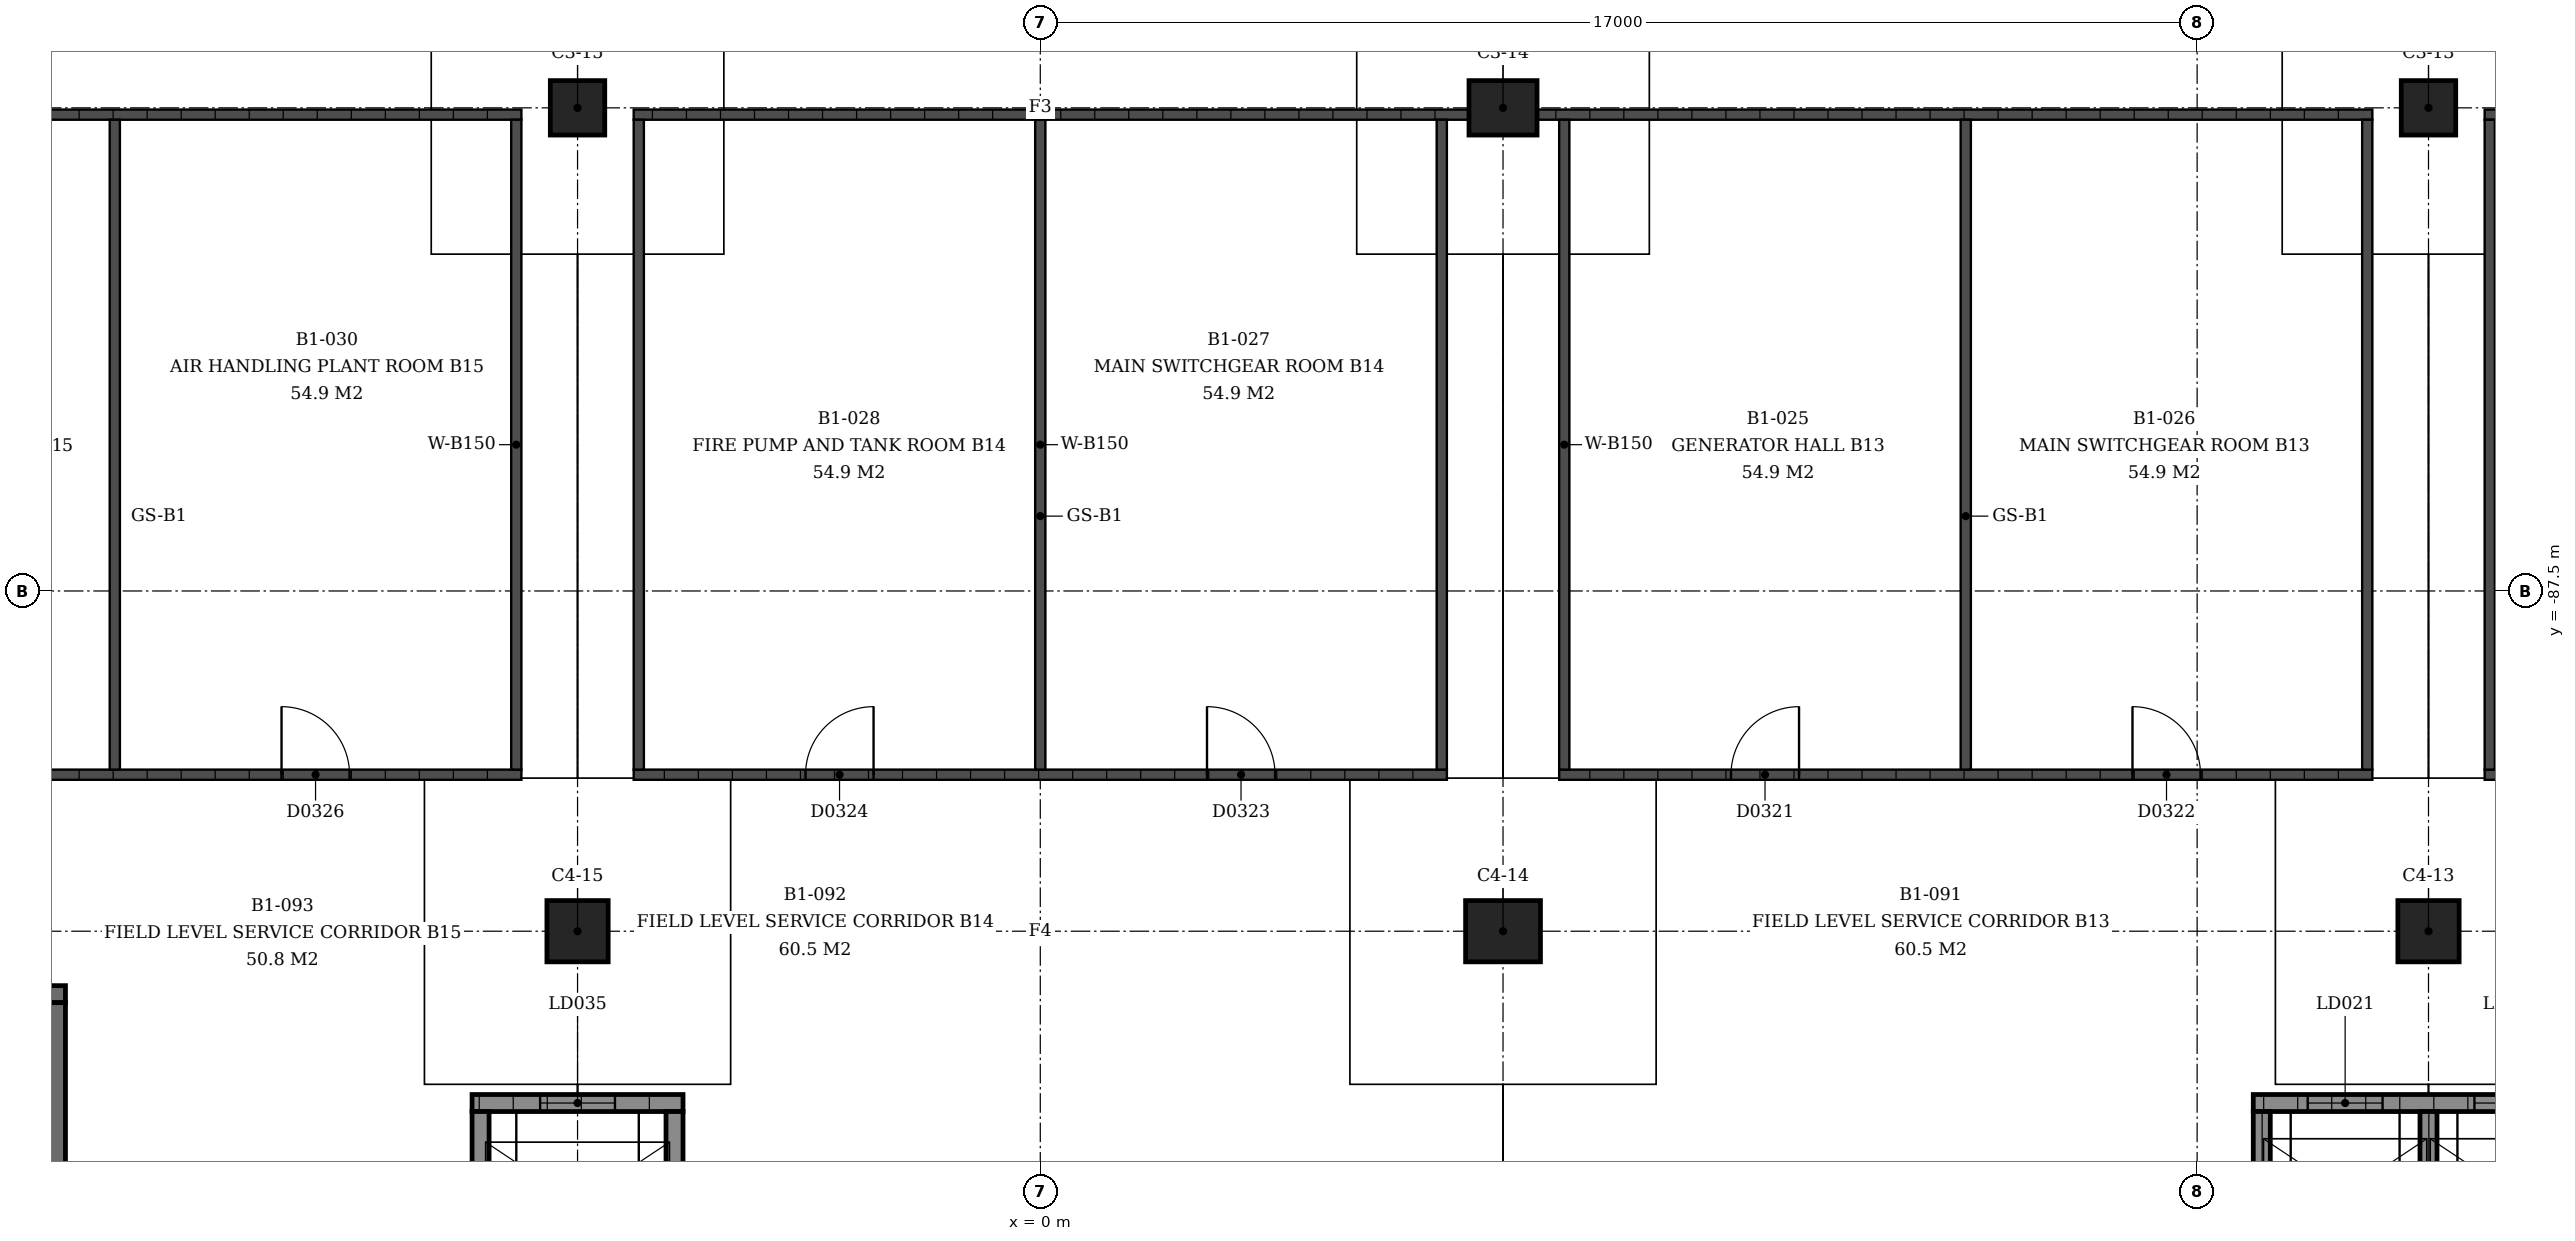
"""IFC4 building model, lengths in metres.
Left out: names, types, materials, properties, quantities, classifications, styles, units other than length and angle.
Written with IfcOpenShell. Run it as: python <this file> out.ifc"""

import sys

from ifc_helpers import new_model, si_unit, direction, frame, frame_2d, origin, origin_2d, place, context, subcontext, project, spatial, rectangle, extrude, element, fill, save


model = new_model("IFC4")
c1 = context("Model", 3, precision=1e-05, world=origin(), true_north=direction((0.0, 1.0)))
c2 = subcontext(c1, "Body", "Model", "MODEL_VIEW")
j1 = project(units=[si_unit("LENGTHUNIT", "METRE"), si_unit("PLANEANGLEUNIT", "RADIAN")], contexts=[c1])
p1 = place(None, origin())
s1 = spatial("IfcSite", under=j1, at=p1, CompositionType="ELEMENT")
p2 = place(p1, origin())
s2 = spatial("IfcBuilding", under=s1, at=p2, CompositionType="ELEMENT")
p3 = place(p2, frame((0.0, 0.0, -4.5)))
s3 = spatial("IfcBuildingStorey", under=s2, at=p3, CompositionType="ELEMENT", Elevation=-4.5)
p4 = place(p3, frame((20.4, -80.4, 0.0), z_axis=(0.0, 0.0, 1.0), x_axis=(1.0, 0.0, 0.0)))
e1 = element("IfcColumn", 1, at=p4, inside=s3, PredefinedType="COLUMN", context=c2, shape_type="SweptSolid", body=[
    extrude(rectangle(XDim=0.8, YDim=0.8, at=origin_2d()), origin(), (0.0, 0.0, 1.0), 4.5),
])
p5 = place(p3, frame((20.4, -92.5, 0.0), z_axis=(0.0, 0.0, 1.0), x_axis=(1.0, 0.0, 0.0)))
e2 = element("IfcColumn", 2, at=p5, inside=s3, PredefinedType="COLUMN", context=c2, shape_type="SweptSolid", body=[
    extrude(rectangle(XDim=0.9, YDim=0.9, at=origin_2d()), origin(), (0.0, 0.0, 1.0), 4.5),
])
p6 = place(p3, frame((6.8, -80.4, 0.0), z_axis=(0.0, 0.0, 1.0), x_axis=(1.0, 0.0, 0.0)))
e3 = element("IfcColumn", 3, at=p6, inside=s3, PredefinedType="COLUMN", context=c2, shape_type="SweptSolid", body=[
    extrude(rectangle(XDim=1.0, YDim=0.8, at=origin_2d()), origin(), (0.0, 0.0, 1.0), 4.5),
])
p7 = place(p3, frame((6.8, -92.5, 0.0), z_axis=(0.0, 0.0, 1.0), x_axis=(1.0, 0.0, 0.0)))
e4 = element("IfcColumn", 4, at=p7, inside=s3, PredefinedType="COLUMN", context=c2, shape_type="SweptSolid", body=[
    extrude(rectangle(XDim=1.1, YDim=0.9, at=origin_2d()), origin(), (0.0, 0.0, 1.0), 4.5),
])
p8 = place(p3, frame((-6.8, -80.4, 0.0), z_axis=(0.0, 0.0, 1.0), x_axis=(1.0, 0.0, 0.0)))
e5 = element("IfcColumn", 5, at=p8, inside=s3, PredefinedType="COLUMN", context=c2, shape_type="SweptSolid", body=[
    extrude(rectangle(XDim=0.8, YDim=0.8, at=origin_2d()), origin(), (0.0, 0.0, 1.0), 4.5),
])
p9 = place(p3, frame((-6.8, -92.5, 0.0), z_axis=(0.0, 0.0, 1.0), x_axis=(1.0, 0.0, 0.0)))
e6 = element("IfcColumn", 6, at=p9, inside=s3, PredefinedType="COLUMN", context=c2, shape_type="SweptSolid", body=[
    extrude(rectangle(XDim=0.9, YDim=0.9, at=origin_2d()), origin(), (0.0, 0.0, 1.0), 4.5),
])
p10 = place(p3, frame((-26.475, -93.425, 0.0), z_axis=(0.0, 0.0, 1.0), x_axis=(1.0, 0.0, 0.0)))
e7 = element("IfcWall", 7, at=p10, inside=s3, PredefinedType="SHEAR", context=c2, shape_type="SweptSolid", body=[
    extrude(rectangle(XDim=12.15, YDim=0.25, at=frame_2d((6.075, 0.0))), origin(), (0.0, 0.0, 1.0), 4.09),
])
p11 = place(p10, frame((2.2, 0.0, 0.0)))
e8 = element("IfcOpeningElement", 8, at=p11, cuts=e7, PredefinedType="OPENING", context=c2, shape_type="SweptSolid", body=[
    extrude(rectangle(XDim=1.8, YDim=2.1, at=frame_2d((0.9, 1.05))), frame((0.0, 0.125, 0.0), z_axis=(0.0, -1.0, 0.0), x_axis=(1.0, 0.0, 0.0)), (0.0, 0.0, 1.0), 0.25),
])
p12 = place(p10, frame((8.15, 0.0, 0.0)))
e9 = element("IfcOpeningElement", 9, at=p12, cuts=e7, PredefinedType="OPENING", context=c2, shape_type="SweptSolid", body=[
    extrude(rectangle(XDim=1.8, YDim=2.1, at=frame_2d((0.9, 1.05))), frame((0.0, 0.125, 0.0), z_axis=(0.0, -1.0, 0.0), x_axis=(1.0, 0.0, 0.0)), (0.0, 0.0, 1.0), 0.25),
])
p13 = place(p3, frame((-14.45, -93.55, 0.0), z_axis=(0.0, 0.0, 1.0), x_axis=(0.0, -1.0, 0.0)))
e10 = element("IfcWall", 10, at=p13, inside=s3, PredefinedType="SHEAR", context=c2, shape_type="SweptSolid", body=[
    extrude(rectangle(XDim=7.46, YDim=0.25, at=frame_2d((3.73, 0.0))), origin(), (0.0, 0.0, 1.0), 4.09),
])
p14 = place(p3, frame((17.825, -95.025, -1.2), z_axis=(0.0, 0.0, 1.0), x_axis=(1.0, 0.0, 0.0)))
e11 = element("IfcWall", 11, at=p14, inside=s3, PredefinedType="SHEAR", context=c2, shape_type="SweptSolid", body=[
    extrude(rectangle(XDim=5.15, YDim=0.25, at=frame_2d((2.575, 0.0))), origin(), (0.0, 0.0, 1.0), 5.29),
])
p15 = place(p14, frame((0.8, 0.0, 1.2)))
e12 = element("IfcOpeningElement", 12, at=p15, cuts=e11, PredefinedType="OPENING", context=c2, shape_type="SweptSolid", body=[
    extrude(rectangle(XDim=1.1, YDim=2.1, at=frame_2d((0.55, 1.05))), frame((0.0, 0.125, 0.0), z_axis=(0.0, -1.0, 0.0), x_axis=(1.0, 0.0, 0.0)), (0.0, 0.0, 1.0), 0.25),
])
p16 = place(p14, frame((3.25, 0.0, 1.2)))
e13 = element("IfcOpeningElement", 13, at=p16, cuts=e11, PredefinedType="OPENING", context=c2, shape_type="SweptSolid", body=[
    extrude(rectangle(XDim=1.1, YDim=2.1, at=frame_2d((0.55, 1.05))), frame((0.0, 0.125, 0.0), z_axis=(0.0, -1.0, 0.0), x_axis=(1.0, 0.0, 0.0)), (0.0, 0.0, 1.0), 0.25),
])
for number, where, z_axis, x_axis in (
    (14, (17.95, -95.15, -1.2), (0.0, 0.0, 1.0), (0.0, -1.0, 0.0)),
    (15, (20.4, -95.15, -1.2), (0.0, 0.0, 1.0), (0.0, -1.0, 0.0)),
):
    element("IfcWall", number, at=place(p3, frame(where, z_axis=z_axis, x_axis=x_axis)), inside=s3, PredefinedType="SHEAR", context=c2, shape_type="SweptSolid", body=[
        extrude(rectangle(XDim=3.0, YDim=0.25, at=frame_2d((1.5, 0.0))), origin(), (0.0, 0.0, 1.0), 5.29),
    ])
p17 = place(p3, frame((-8.35, -95.025, -1.2), z_axis=(0.0, 0.0, 1.0), x_axis=(1.0, 0.0, 0.0)))
e16 = element("IfcWall", 16, at=p17, inside=s3, PredefinedType="SHEAR", context=c2, shape_type="SweptSolid", body=[
    extrude(rectangle(XDim=3.1, YDim=0.25, at=frame_2d((1.55, 0.0))), origin(), (0.0, 0.0, 1.0), 5.29),
])
p18 = place(p17, frame((1.0, 0.0, 1.2)))
e17 = element("IfcOpeningElement", 17, at=p18, cuts=e16, PredefinedType="OPENING", context=c2, shape_type="SweptSolid", body=[
    extrude(rectangle(XDim=1.1, YDim=2.1, at=frame_2d((0.55, 1.05))), frame((0.0, 0.125, 0.0), z_axis=(0.0, -1.0, 0.0), x_axis=(1.0, 0.0, 0.0)), (0.0, 0.0, 1.0), 0.25),
])
for number, where, z_axis, x_axis in (
    (18, (-8.225, -95.15, -1.2), (0.0, 0.0, 1.0), (0.0, -1.0, 0.0)),
    (19, (-5.375, -95.15, -1.2), (0.0, 0.0, 1.0), (0.0, -1.0, 0.0)),
):
    element("IfcWall", number, at=place(p3, frame(where, z_axis=z_axis, x_axis=x_axis)), inside=s3, PredefinedType="SHEAR", context=c2, shape_type="SweptSolid", body=[
        extrude(rectangle(XDim=3.4, YDim=0.25, at=frame_2d((1.7, 0.0))), origin(), (0.0, 0.0, 1.0), 5.29),
    ])
p19 = place(p3, frame((33.5, -80.5, 0.0), z_axis=(0.0, 0.0, 1.0), x_axis=(-1.0, 0.0, 0.0)))
e20 = element("IfcWall", 20, at=p19, inside=s3, PredefinedType="SOLIDWALL", context=c2, shape_type="SweptSolid", body=[
    extrude(rectangle(XDim=12.275, YDim=0.15, at=frame_2d((6.137, 0.0))), origin(), (0.0, 0.0, 1.0), 3.0),
])
p20 = place(p3, frame((33.175, -90.2, 0.0), z_axis=(0.0, 0.0, 1.0), x_axis=(-1.0, 0.0, 0.0)))
e21 = element("IfcWall", 21, at=p20, inside=s3, PredefinedType="SOLIDWALL", context=c2, shape_type="SweptSolid", body=[
    extrude(rectangle(XDim=11.95, YDim=0.15, at=frame_2d((5.975, 0.0))), origin(), (0.0, 0.0, 1.0), 3.0),
])
p21 = place(p20, frame((2.525, 0.0, 0.0)))
e22 = element("IfcOpeningElement", 22, at=p21, cuts=e21, PredefinedType="OPENING", context=c2, shape_type="SweptSolid", body=[
    extrude(rectangle(XDim=1.0, YDim=2.1, at=frame_2d((0.5, 1.05))), frame((0.0, 0.075, 0.0), z_axis=(0.0, -1.0, 0.0), x_axis=(1.0, 0.0, 0.0)), (0.0, 0.0, 1.0), 0.15),
])
p22 = place(p20, frame((8.425, 0.0, 0.0)))
e23 = element("IfcOpeningElement", 23, at=p22, cuts=e21, PredefinedType="OPENING", context=c2, shape_type="SweptSolid", body=[
    extrude(rectangle(XDim=1.0, YDim=2.1, at=frame_2d((0.5, 1.05))), frame((0.0, 0.075, 0.0), z_axis=(0.0, -1.0, 0.0), x_axis=(1.0, 0.0, 0.0)), (0.0, 0.0, 1.0), 0.15),
])
p23 = place(p3, frame((21.3, -80.575, 0.0), z_axis=(0.0, 0.0, 1.0), x_axis=(0.0, -1.0, 0.0)))
e24 = element("IfcWall", 24, at=p23, inside=s3, PredefinedType="SOLIDWALL", context=c2, shape_type="SweptSolid", body=[
    extrude(rectangle(XDim=9.55, YDim=0.15, at=frame_2d((4.775, 0.0))), origin(), (0.0, 0.0, 1.0), 3.0),
])
p24 = place(p3, frame((7.3, -80.5, 0.0), z_axis=(0.0, 0.0, 1.0), x_axis=(1.0, 0.0, 0.0)))
e25 = element("IfcWall", 25, at=p24, inside=s3, PredefinedType="SOLIDWALL", context=c2, shape_type="SweptSolid", body=[
    extrude(rectangle(XDim=12.275, YDim=0.15, at=frame_2d((6.137, 0.0))), origin(), (0.0, 0.0, 1.0), 3.0),
])
p25 = place(p3, frame((7.625, -90.2, 0.0), z_axis=(0.0, 0.0, 1.0), x_axis=(1.0, 0.0, 0.0)))
e26 = element("IfcWall", 26, at=p25, inside=s3, PredefinedType="SOLIDWALL", context=c2, shape_type="SweptSolid", body=[
    extrude(rectangle(XDim=11.95, YDim=0.15, at=frame_2d((5.975, 0.0))), origin(), (0.0, 0.0, 1.0), 3.0),
])
p26 = place(p25, frame((2.525, 0.0, 0.0)))
e27 = element("IfcOpeningElement", 27, at=p26, cuts=e26, PredefinedType="OPENING", context=c2, shape_type="SweptSolid", body=[
    extrude(rectangle(XDim=1.0, YDim=2.1, at=frame_2d((0.5, 1.05))), frame((0.0, 0.075, 0.0), z_axis=(0.0, -1.0, 0.0), x_axis=(1.0, 0.0, 0.0)), (0.0, 0.0, 1.0), 0.15),
])
p27 = place(p25, frame((8.425, 0.0, 0.0)))
e28 = element("IfcOpeningElement", 28, at=p27, cuts=e26, PredefinedType="OPENING", context=c2, shape_type="SweptSolid", body=[
    extrude(rectangle(XDim=1.0, YDim=2.1, at=frame_2d((0.5, 1.05))), frame((0.0, 0.075, 0.0), z_axis=(0.0, -1.0, 0.0), x_axis=(1.0, 0.0, 0.0)), (0.0, 0.0, 1.0), 0.15),
])
for number, where, z_axis, x_axis in (
    (29, (7.7, -80.575, 0.0), (0.0, 0.0, 1.0), (0.0, -1.0, 0.0)),
    (30, (13.6, -80.575, 0.0), (0.0, 0.0, 1.0), (0.0, -1.0, 0.0)),
    (31, (19.5, -80.575, 0.0), (0.0, 0.0, 1.0), (0.0, -1.0, 0.0)),
):
    element("IfcWall", number, at=place(p3, frame(where, z_axis=z_axis, x_axis=x_axis)), inside=s3, PredefinedType="SOLIDWALL", context=c2, shape_type="SweptSolid", body=[
        extrude(rectangle(XDim=9.55, YDim=0.15, at=frame_2d((4.775, 0.0))), origin(), (0.0, 0.0, 1.0), 3.0),
    ])
p28 = place(p3, frame((6.3, -80.5, 0.0), z_axis=(0.0, 0.0, 1.0), x_axis=(-1.0, 0.0, 0.0)))
e32 = element("IfcWall", 32, at=p28, inside=s3, PredefinedType="SOLIDWALL", context=c2, shape_type="SweptSolid", body=[
    extrude(rectangle(XDim=12.275, YDim=0.15, at=frame_2d((6.138, 0.0))), origin(), (0.0, 0.0, 1.0), 3.0),
])
p29 = place(p3, frame((5.975, -90.2, 0.0), z_axis=(0.0, 0.0, 1.0), x_axis=(-1.0, 0.0, 0.0)))
e33 = element("IfcWall", 33, at=p29, inside=s3, PredefinedType="SOLIDWALL", context=c2, shape_type="SweptSolid", body=[
    extrude(rectangle(XDim=11.95, YDim=0.15, at=frame_2d((5.975, 0.0))), origin(), (0.0, 0.0, 1.0), 3.0),
])
p30 = place(p29, frame((2.525, 0.0, 0.0)))
e34 = element("IfcOpeningElement", 34, at=p30, cuts=e33, PredefinedType="OPENING", context=c2, shape_type="SweptSolid", body=[
    extrude(rectangle(XDim=1.0, YDim=2.1, at=frame_2d((0.5, 1.05))), frame((0.0, 0.075, 0.0), z_axis=(0.0, -1.0, 0.0), x_axis=(1.0, 0.0, 0.0)), (0.0, 0.0, 1.0), 0.15),
])
p31 = place(p29, frame((8.425, 0.0, 0.0)))
e35 = element("IfcOpeningElement", 35, at=p31, cuts=e33, PredefinedType="OPENING", context=c2, shape_type="SweptSolid", body=[
    extrude(rectangle(XDim=1.0, YDim=2.1, at=frame_2d((0.5, 1.05))), frame((0.0, 0.075, 0.0), z_axis=(0.0, -1.0, 0.0), x_axis=(1.0, 0.0, 0.0)), (0.0, 0.0, 1.0), 0.15),
])
for number, where, z_axis, x_axis in (
    (36, (5.9, -80.575, 0.0), (0.0, 0.0, 1.0), (0.0, -1.0, 0.0)),
    (37, (0.0, -80.575, 0.0), (0.0, 0.0, 1.0), (0.0, -1.0, 0.0)),
    (38, (-5.9, -80.575, 0.0), (0.0, 0.0, 1.0), (0.0, -1.0, 0.0)),
):
    element("IfcWall", number, at=place(p3, frame(where, z_axis=z_axis, x_axis=x_axis)), inside=s3, PredefinedType="SOLIDWALL", context=c2, shape_type="SweptSolid", body=[
        extrude(rectangle(XDim=9.55, YDim=0.15, at=frame_2d((4.775, 0.0))), origin(), (0.0, 0.0, 1.0), 3.0),
    ])
p32 = place(p3, frame((-19.9, -80.5, 0.0), z_axis=(0.0, 0.0, 1.0), x_axis=(1.0, 0.0, 0.0)))
e39 = element("IfcWall", 39, at=p32, inside=s3, PredefinedType="SOLIDWALL", context=c2, shape_type="SweptSolid", body=[
    extrude(rectangle(XDim=12.275, YDim=0.15, at=frame_2d((6.137, 0.0))), origin(), (0.0, 0.0, 1.0), 3.0),
])
p33 = place(p3, frame((-19.575, -90.2, 0.0), z_axis=(0.0, 0.0, 1.0), x_axis=(1.0, 0.0, 0.0)))
e40 = element("IfcWall", 40, at=p33, inside=s3, PredefinedType="SOLIDWALL", context=c2, shape_type="SweptSolid", body=[
    extrude(rectangle(XDim=11.95, YDim=0.15, at=frame_2d((5.975, 0.0))), origin(), (0.0, 0.0, 1.0), 3.0),
])
p34 = place(p33, frame((2.525, 0.0, 0.0)))
e41 = element("IfcOpeningElement", 41, at=p34, cuts=e40, PredefinedType="OPENING", context=c2, shape_type="SweptSolid", body=[
    extrude(rectangle(XDim=1.0, YDim=2.1, at=frame_2d((0.5, 1.05))), frame((0.0, 0.075, 0.0), z_axis=(0.0, -1.0, 0.0), x_axis=(1.0, 0.0, 0.0)), (0.0, 0.0, 1.0), 0.15),
])
p35 = place(p33, frame((8.425, 0.0, 0.0)))
e42 = element("IfcOpeningElement", 42, at=p35, cuts=e40, PredefinedType="OPENING", context=c2, shape_type="SweptSolid", body=[
    extrude(rectangle(XDim=1.0, YDim=2.1, at=frame_2d((0.5, 1.05))), frame((0.0, 0.075, 0.0), z_axis=(0.0, -1.0, 0.0), x_axis=(1.0, 0.0, 0.0)), (0.0, 0.0, 1.0), 0.15),
])
for number, where, z_axis, x_axis in (
    (43, (-13.6, -80.575, 0.0), (0.0, 0.0, 1.0), (0.0, -1.0, 0.0)),
    (44, (-7.7, -80.575, 0.0), (0.0, 0.0, 1.0), (0.0, -1.0, 0.0)),
):
    element("IfcWall", number, at=place(p3, frame(where, z_axis=z_axis, x_axis=x_axis)), inside=s3, PredefinedType="SOLIDWALL", context=c2, shape_type="SweptSolid", body=[
        extrude(rectangle(XDim=9.55, YDim=0.15, at=frame_2d((4.775, 0.0))), origin(), (0.0, 0.0, 1.0), 3.0),
    ])
p36 = place(p15, origin())
e45 = element("IfcDoor", 45, at=p36, inside=s3, OperationType="SLIDING_TO_LEFT", PredefinedType="DOOR", context=c2, shape_type="SweptSolid", body=[
    extrude(rectangle(XDim=1.1, YDim=2.1, at=frame_2d((0.55, 1.05))), frame((0.0, 0.025, 0.0), z_axis=(0.0, -1.0, 0.0), x_axis=(1.0, 0.0, 0.0)), (0.0, 0.0, 1.0), 0.05),
])
fill(e12, e45)
p37 = place(p16, origin())
e46 = element("IfcDoor", 46, at=p37, inside=s3, OperationType="SLIDING_TO_LEFT", PredefinedType="DOOR", context=c2, shape_type="SweptSolid", body=[
    extrude(rectangle(XDim=1.1, YDim=2.1, at=frame_2d((0.55, 1.05))), frame((0.0, 0.025, 0.0), z_axis=(0.0, -1.0, 0.0), x_axis=(1.0, 0.0, 0.0)), (0.0, 0.0, 1.0), 0.05),
])
fill(e13, e46)
p38 = place(p18, origin())
e47 = element("IfcDoor", 47, at=p38, inside=s3, OperationType="SLIDING_TO_LEFT", PredefinedType="DOOR", context=c2, shape_type="SweptSolid", body=[
    extrude(rectangle(XDim=1.1, YDim=2.1, at=frame_2d((0.55, 1.05))), frame((0.0, 0.025, 0.0), z_axis=(0.0, -1.0, 0.0), x_axis=(1.0, 0.0, 0.0)), (0.0, 0.0, 1.0), 0.05),
])
fill(e17, e47)
p39 = place(p26, origin())
e48 = element("IfcDoor", 48, at=p39, inside=s3, OperationType="SINGLE_SWING_LEFT", PredefinedType="DOOR", context=c2, shape_type="SweptSolid", body=[
    extrude(rectangle(XDim=1.0, YDim=2.1, at=frame_2d((0.5, 1.05))), frame((0.0, 0.025, 0.0), z_axis=(0.0, -1.0, 0.0), x_axis=(1.0, 0.0, 0.0)), (0.0, 0.0, 1.0), 0.05),
])
fill(e27, e48)
p40 = place(p27, origin())
e49 = element("IfcDoor", 49, at=p40, inside=s3, OperationType="SINGLE_SWING_RIGHT", PredefinedType="DOOR", context=c2, shape_type="SweptSolid", body=[
    extrude(rectangle(XDim=1.0, YDim=2.1, at=frame_2d((0.5, 1.05))), frame((0.0, 0.025, 0.0), z_axis=(0.0, -1.0, 0.0), x_axis=(1.0, 0.0, 0.0)), (0.0, 0.0, 1.0), 0.05),
])
fill(e28, e49)
p41 = place(p30, origin())
e50 = element("IfcDoor", 50, at=p41, inside=s3, OperationType="SINGLE_SWING_RIGHT", PredefinedType="DOOR", context=c2, shape_type="SweptSolid", body=[
    extrude(rectangle(XDim=1.0, YDim=2.1, at=frame_2d((0.5, 1.05))), frame((0.0, 0.025, 0.0), z_axis=(0.0, -1.0, 0.0), x_axis=(1.0, 0.0, 0.0)), (0.0, 0.0, 1.0), 0.05),
])
fill(e34, e50)
p42 = place(p31, origin())
e51 = element("IfcDoor", 51, at=p42, inside=s3, OperationType="SINGLE_SWING_LEFT", PredefinedType="DOOR", context=c2, shape_type="SweptSolid", body=[
    extrude(rectangle(XDim=1.0, YDim=2.1, at=frame_2d((0.5, 1.05))), frame((0.0, 0.025, 0.0), z_axis=(0.0, -1.0, 0.0), x_axis=(1.0, 0.0, 0.0)), (0.0, 0.0, 1.0), 0.05),
])
fill(e35, e51)
p43 = place(p35, origin())
e52 = element("IfcDoor", 52, at=p43, inside=s3, OperationType="SINGLE_SWING_RIGHT", PredefinedType="DOOR", context=c2, shape_type="SweptSolid", body=[
    extrude(rectangle(XDim=1.0, YDim=2.1, at=frame_2d((0.5, 1.05))), frame((0.0, 0.025, 0.0), z_axis=(0.0, -1.0, 0.0), x_axis=(1.0, 0.0, 0.0)), (0.0, 0.0, 1.0), 0.05),
])
fill(e42, e52)
save(model, sys.argv[1])
